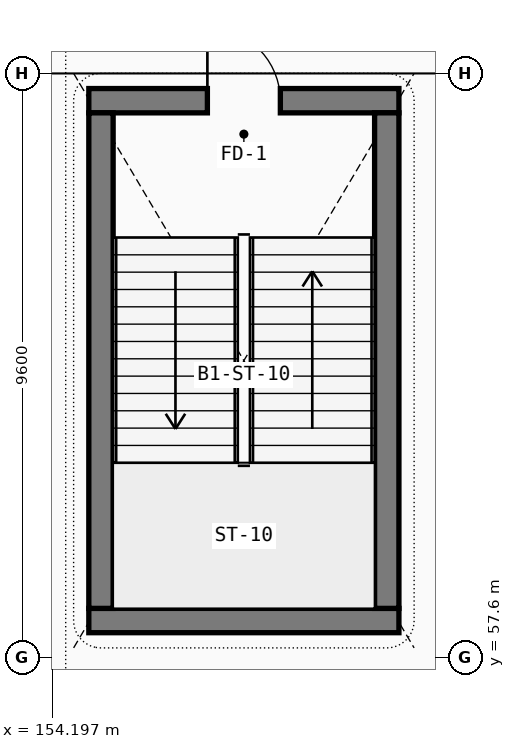
"""IFC4 building model, lengths in metres.
Left out: names, types, materials, properties, quantities, classifications, styles, units other than length and angle.
Written with IfcOpenShell. Run it as: python <this file> out.ifc"""

import sys

from ifc_helpers import new_model, si_unit, direction, frame, frame_2d, origin, place, context, subcontext, project, spatial, rectangle, extrude, element, fill, save


model = new_model("IFC4")
c1 = context("Model", 3, precision=1e-05, world=origin(), true_north=direction((0.0, 1.0)))
c2 = subcontext(c1, "Body", "Model", "MODEL_VIEW")
j1 = project(units=[si_unit("LENGTHUNIT", "METRE"), si_unit("PLANEANGLEUNIT", "RADIAN")], contexts=[c1])
p1 = place(None, origin())
s1 = spatial("IfcSite", under=j1, at=p1, CompositionType="ELEMENT")
p2 = place(p1, origin())
s2 = spatial("IfcBuilding", under=s1, at=p2, CompositionType="ELEMENT")
p3 = place(p2, frame((0.0, 0.0, -4.8)))
s3 = spatial("IfcBuildingStorey", under=s2, at=p3, CompositionType="ELEMENT", Elevation=-4.8)
p4 = place(p3, frame((154.8, 58.2, 0.0), z_axis=(0.0, 0.0, 1.0), x_axis=(1.0, 0.0, 0.0)))
e1 = element("IfcWall", 1, at=p4, inside=s3, PredefinedType="SHEAR", context=c2, shape_type="SweptSolid", body=[
    extrude(rectangle(XDim=5.1, YDim=0.4, at=frame_2d((2.55, 0.0))), origin(), (0.0, 0.0, 1.0), 4.5),
])
p5 = place(p3, frame((159.9, 66.75, 0.0), z_axis=(0.0, 0.0, 1.0), x_axis=(-1.0, 0.0, 0.0)))
e2 = element("IfcWall", 2, at=p5, inside=s3, PredefinedType="SHEAR", context=c2, shape_type="SweptSolid", body=[
    extrude(rectangle(XDim=5.1, YDim=0.4, at=frame_2d((2.55, 0.0))), origin(), (0.0, 0.0, 1.0), 4.5),
])
p6 = place(p5, frame((3.15, 0.0, 0.0), z_axis=(0.0, 0.0, 1.0), x_axis=(-1.0, 0.0, 0.0)))
e3 = element("IfcOpeningElement", 3, at=p6, cuts=e2, PredefinedType="OPENING", context=c2, shape_type="SweptSolid", body=[
    extrude(rectangle(XDim=1.2, YDim=2.2, at=frame_2d((0.6, 1.1))), frame((0.0, 0.21, 0.0), z_axis=(0.0, -1.0, 0.0), x_axis=(1.0, 0.0, 0.0)), (0.0, 0.0, 1.0), 0.42),
])
for number, where, z_axis, x_axis in (
    (4, (155.0, 66.55, 0.0), (0.0, 0.0, 1.0), (0.0, -1.0, 0.0)),
    (5, (159.7, 58.4, 0.0), (0.0, 0.0, 1.0), (0.0, 1.0, 0.0)),
):
    element("IfcWall", number, at=place(p3, frame(where, z_axis=z_axis, x_axis=x_axis)), inside=s3, PredefinedType="SHEAR", context=c2, shape_type="SweptSolid", body=[
        extrude(rectangle(XDim=8.15, YDim=0.4, at=frame_2d((4.075, 0.0))), origin(), (0.0, 0.0, 1.0), 4.5),
    ])
p7 = place(p6, origin())
e6 = element("IfcDoor", 6, at=p7, inside=s3, OperationType="SINGLE_SWING_LEFT", PredefinedType="DOOR", context=c2, shape_type="SweptSolid", body=[
    extrude(rectangle(XDim=1.2, YDim=2.2, at=frame_2d((0.6, 1.1))), frame((0.0, 0.025, 0.0), z_axis=(0.0, -1.0, 0.0), x_axis=(1.0, 0.0, 0.0)), (0.0, 0.0, 1.0), 0.05),
])
fill(e3, e6)
save(model, sys.argv[1])
